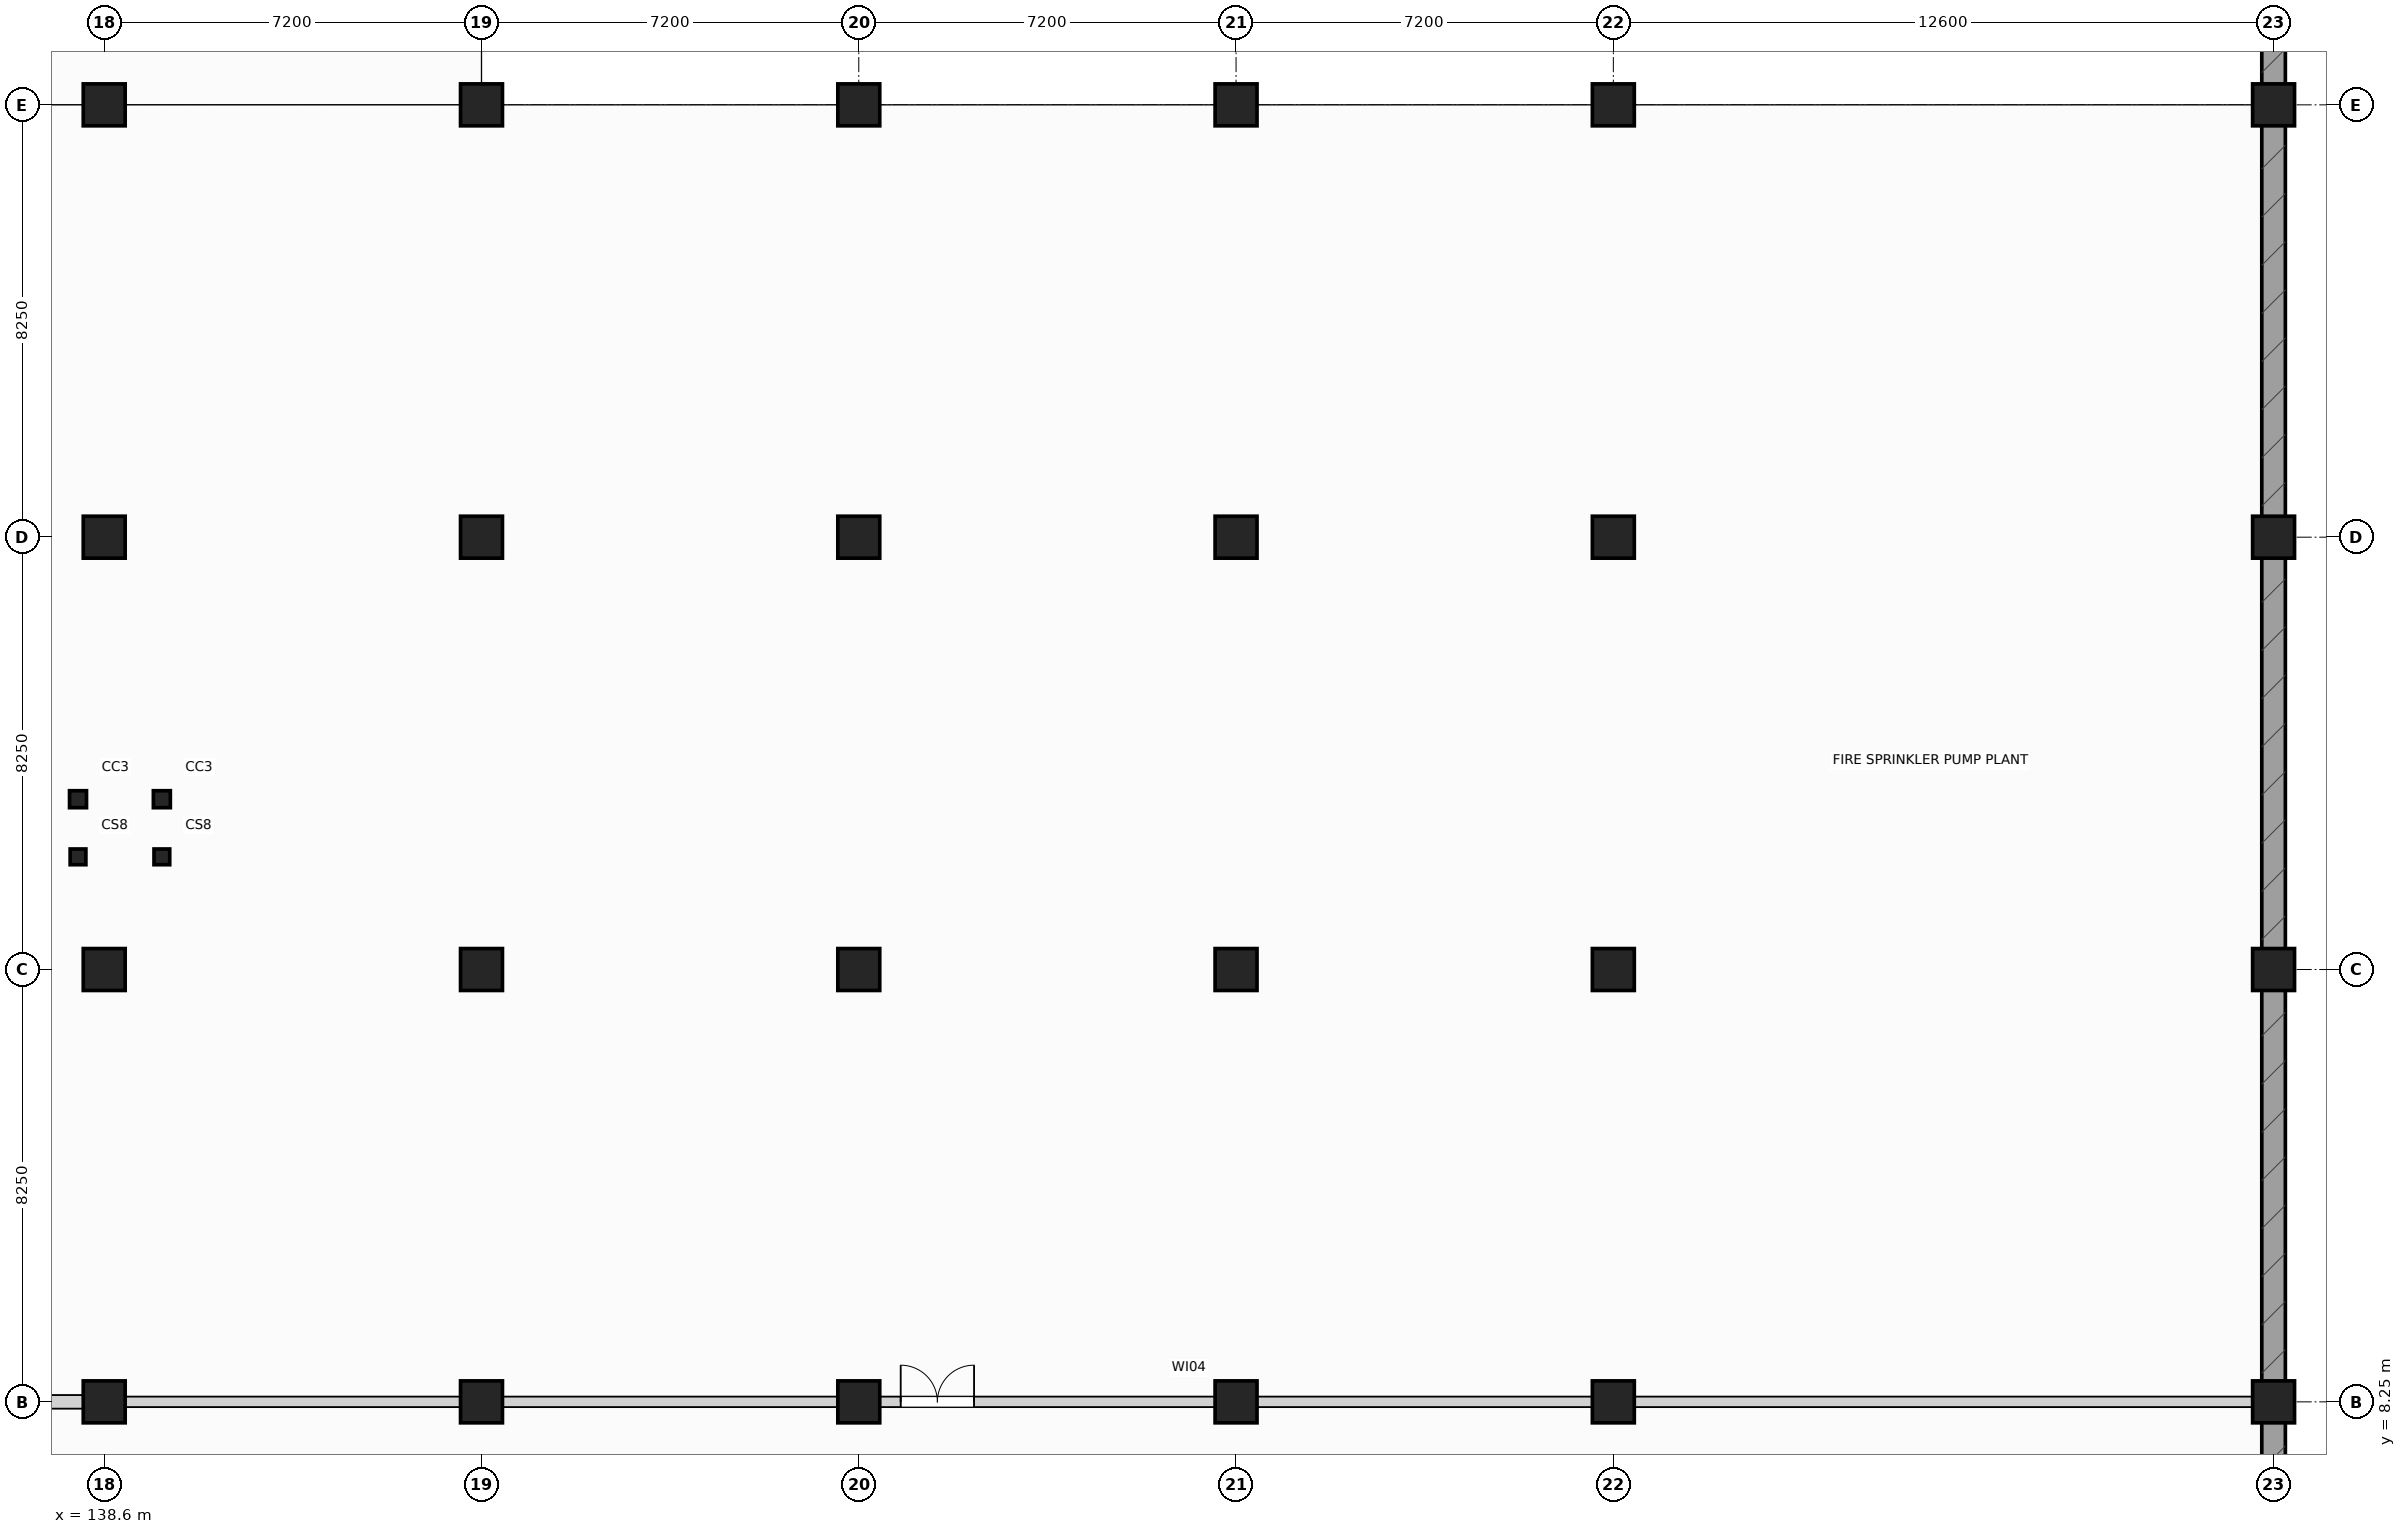
"""IFC4 building model, lengths in metres.
Left out: names, types, materials, properties, quantities, classifications, styles, units other than length and angle.
Written with IfcOpenShell. Run it as: python <this file> out.ifc"""

import sys

from ifc_helpers import new_model, si_unit, direction, frame, frame_2d, origin, origin_2d, place, context, subcontext, project, spatial, rectangle, hollow_circle, i_section, extrude, element, fill, save


model = new_model("IFC4")
c1 = context("Model", 3, precision=1e-05, world=origin(), true_north=direction((0.0, 1.0)))
c2 = subcontext(c1, "Body", "Model", "MODEL_VIEW")
j1 = project(units=[si_unit("LENGTHUNIT", "METRE"), si_unit("PLANEANGLEUNIT", "RADIAN")], contexts=[c1])
p1 = place(None, origin())
s1 = spatial("IfcSite", under=j1, at=p1, CompositionType="ELEMENT")
p2 = place(p1, origin())
s2 = spatial("IfcBuilding", under=s1, at=p2, CompositionType="ELEMENT")
p3 = place(p2, frame((0.0, 0.0, -5.4)))
s3 = spatial("IfcBuildingStorey", under=s2, at=p3, CompositionType="ELEMENT", Elevation=-5.4)
for number, where, z_axis, x_axis in (
    (1, (138.6, 8.25, 0.0), (0.0, 0.0, 1.0), (1.0, 0.0, 0.0)),
    (2, (138.6, 16.5, 0.0), (0.0, 0.0, 1.0), (1.0, 0.0, 0.0)),
    (3, (138.6, 24.75, 0.0), (0.0, 0.0, 1.0), (1.0, 0.0, 0.0)),
    (4, (138.6, 33.0, 0.0), (0.0, 0.0, 1.0), (1.0, 0.0, 0.0)),
    (5, (145.8, 8.25, 0.0), (0.0, 0.0, 1.0), (1.0, 0.0, 0.0)),
    (6, (145.8, 16.5, 0.0), (0.0, 0.0, 1.0), (1.0, 0.0, 0.0)),
    (7, (145.8, 24.75, 0.0), (0.0, 0.0, 1.0), (1.0, 0.0, 0.0)),
    (8, (145.8, 33.0, 0.0), (0.0, 0.0, 1.0), (1.0, 0.0, 0.0)),
    (9, (153.0, 8.25, 0.0), (0.0, 0.0, 1.0), (1.0, 0.0, 0.0)),
    (10, (153.0, 16.5, 0.0), (0.0, 0.0, 1.0), (1.0, 0.0, 0.0)),
    (11, (153.0, 24.75, 0.0), (0.0, 0.0, 1.0), (1.0, 0.0, 0.0)),
    (12, (153.0, 33.0, 0.0), (0.0, 0.0, 1.0), (1.0, 0.0, 0.0)),
    (13, (160.2, 8.25, 0.0), (0.0, 0.0, 1.0), (1.0, 0.0, 0.0)),
    (14, (160.2, 16.5, 0.0), (0.0, 0.0, 1.0), (1.0, 0.0, 0.0)),
    (15, (160.2, 24.75, 0.0), (0.0, 0.0, 1.0), (1.0, 0.0, 0.0)),
    (16, (160.2, 33.0, 0.0), (0.0, 0.0, 1.0), (1.0, 0.0, 0.0)),
    (17, (167.4, 8.25, 0.0), (0.0, 0.0, 1.0), (1.0, 0.0, 0.0)),
    (18, (167.4, 16.5, 0.0), (0.0, 0.0, 1.0), (1.0, 0.0, 0.0)),
    (19, (167.4, 24.75, 0.0), (0.0, 0.0, 1.0), (1.0, 0.0, 0.0)),
    (20, (167.4, 33.0, 0.0), (0.0, 0.0, 1.0), (1.0, 0.0, 0.0)),
    (21, (180.0, 8.25, 0.0), (0.0, 0.0, 1.0), (1.0, 0.0, 0.0)),
    (22, (180.0, 16.5, 0.0), (0.0, 0.0, 1.0), (1.0, 0.0, 0.0)),
    (23, (180.0, 24.75, 0.0), (0.0, 0.0, 1.0), (1.0, 0.0, 0.0)),
    (24, (180.0, 33.0, 0.0), (0.0, 0.0, 1.0), (1.0, 0.0, 0.0)),
):
    element("IfcColumn", number, at=place(p3, frame(where, z_axis=z_axis, x_axis=x_axis)), inside=s3, PredefinedType="COLUMN", context=c2, shape_type="SweptSolid", body=[
        extrude(rectangle(XDim=0.8, YDim=0.8, at=origin_2d()), origin(), (0.0, 0.0, 1.0), 5.4),
    ])
p4 = place(p3, frame((180.0, 0.0, 0.0), z_axis=(0.0, 0.0, 1.0), x_axis=(0.0, 1.0, 0.0)))
e25 = element("IfcWall", 25, at=p4, inside=s3, PredefinedType="USERDEFINED", context=c2, shape_type="SweptSolid", body=[
    extrude(rectangle(XDim=120.0, YDim=0.45, at=frame_2d((60.0, 0.0))), origin(), (0.0, 0.0, 1.0), 5.08),
])
for number, where, z_axis, x_axis in (
    (26, (138.1, 18.65, 0.0), (0.0, 0.0, 1.0), (1.0, 0.0, 0.0)),
    (27, (139.7, 18.65, 0.0), (0.0, 0.0, 1.0), (1.0, 0.0, 0.0)),
):
    element("IfcColumn", number, at=place(p3, frame(where, z_axis=z_axis, x_axis=x_axis)), inside=s3, PredefinedType="COLUMN", context=c2, shape_type="SweptSolid", body=[
        extrude(i_section(OverallWidth=0.3, OverallDepth=0.3, WebThickness=0.011, FlangeThickness=0.019, at=origin_2d()), origin(), (0.0, 0.0, 1.0), 5.4),
    ])
for number, where, z_axis, x_axis in (
    (28, (138.1, 19.75, 0.0), (0.0, 0.0, 1.0), (1.0, 0.0, 0.0)),
    (29, (139.7, 19.75, 0.0), (0.0, 0.0, 1.0), (1.0, 0.0, 0.0)),
):
    element("IfcColumn", number, at=place(p3, frame(where, z_axis=z_axis, x_axis=x_axis)), inside=s3, PredefinedType="COLUMN", context=c2, shape_type="SweptSolid", body=[
        extrude(hollow_circle(Radius=0.162, WallThickness=0.016, at=origin_2d()), origin(), (0.0, 0.0, 1.0), 5.4),
    ])
p5 = place(p3, frame((95.4, 8.25, 0.0), z_axis=(0.0, 0.0, 1.0), x_axis=(1.0, 0.0, 0.0)))
e30 = element("IfcWall", 30, at=p5, inside=s3, PredefinedType="PARTITIONING", context=c2, shape_type="SweptSolid", body=[
    extrude(rectangle(XDim=43.2, YDim=0.26, at=frame_2d((21.6, 0.0))), origin(), (0.0, 0.0, 1.0), 4.345),
])
p6 = place(p5, frame((15.732, 0.0, 0.0)))
e31 = element("IfcOpeningElement", 31, at=p6, cuts=e30, PredefinedType="OPENING", context=c2, shape_type="SweptSolid", body=[
    extrude(rectangle(XDim=1.8, YDim=2.45, at=frame_2d((0.9, 1.225))), frame((0.0, 0.14, 0.0), z_axis=(0.0, -1.0, 0.0), x_axis=(1.0, 0.0, 0.0)), (0.0, 0.0, 1.0), 0.28),
])
p7 = place(p3, frame((138.6, 8.25, 0.0), z_axis=(0.0, 0.0, 1.0), x_axis=(1.0, 0.0, 0.0)))
e32 = element("IfcWall", 32, at=p7, inside=s3, PredefinedType="PARTITIONING", context=c2, shape_type="SweptSolid", body=[
    extrude(rectangle(XDim=41.4, YDim=0.2, at=frame_2d((20.7, 0.0))), origin(), (0.0, 0.0, 1.0), 2.735),
])
p8 = place(p7, frame((15.2, 0.0, 0.0)))
e33 = element("IfcOpeningElement", 33, at=p8, cuts=e32, PredefinedType="OPENING", context=c2, shape_type="SweptSolid", body=[
    extrude(rectangle(XDim=1.4, YDim=2.18, at=frame_2d((0.7, 1.09))), frame((0.0, 0.11, 0.0), z_axis=(0.0, -1.0, 0.0), x_axis=(1.0, 0.0, 0.0)), (0.0, 0.0, 1.0), 0.22),
])
p9 = place(p8, origin())
e34 = element("IfcDoor", 34, at=p9, inside=s3, OperationType="DOUBLE_DOOR_SINGLE_SWING", PredefinedType="DOOR", context=c2, shape_type="SweptSolid", body=[
    extrude(rectangle(XDim=1.4, YDim=2.18, at=frame_2d((0.7, 1.09))), frame((0.0, 0.025, 0.0), z_axis=(0.0, -1.0, 0.0), x_axis=(1.0, 0.0, 0.0)), (0.0, 0.0, 1.0), 0.05),
])
fill(e33, e34)
save(model, sys.argv[1])
